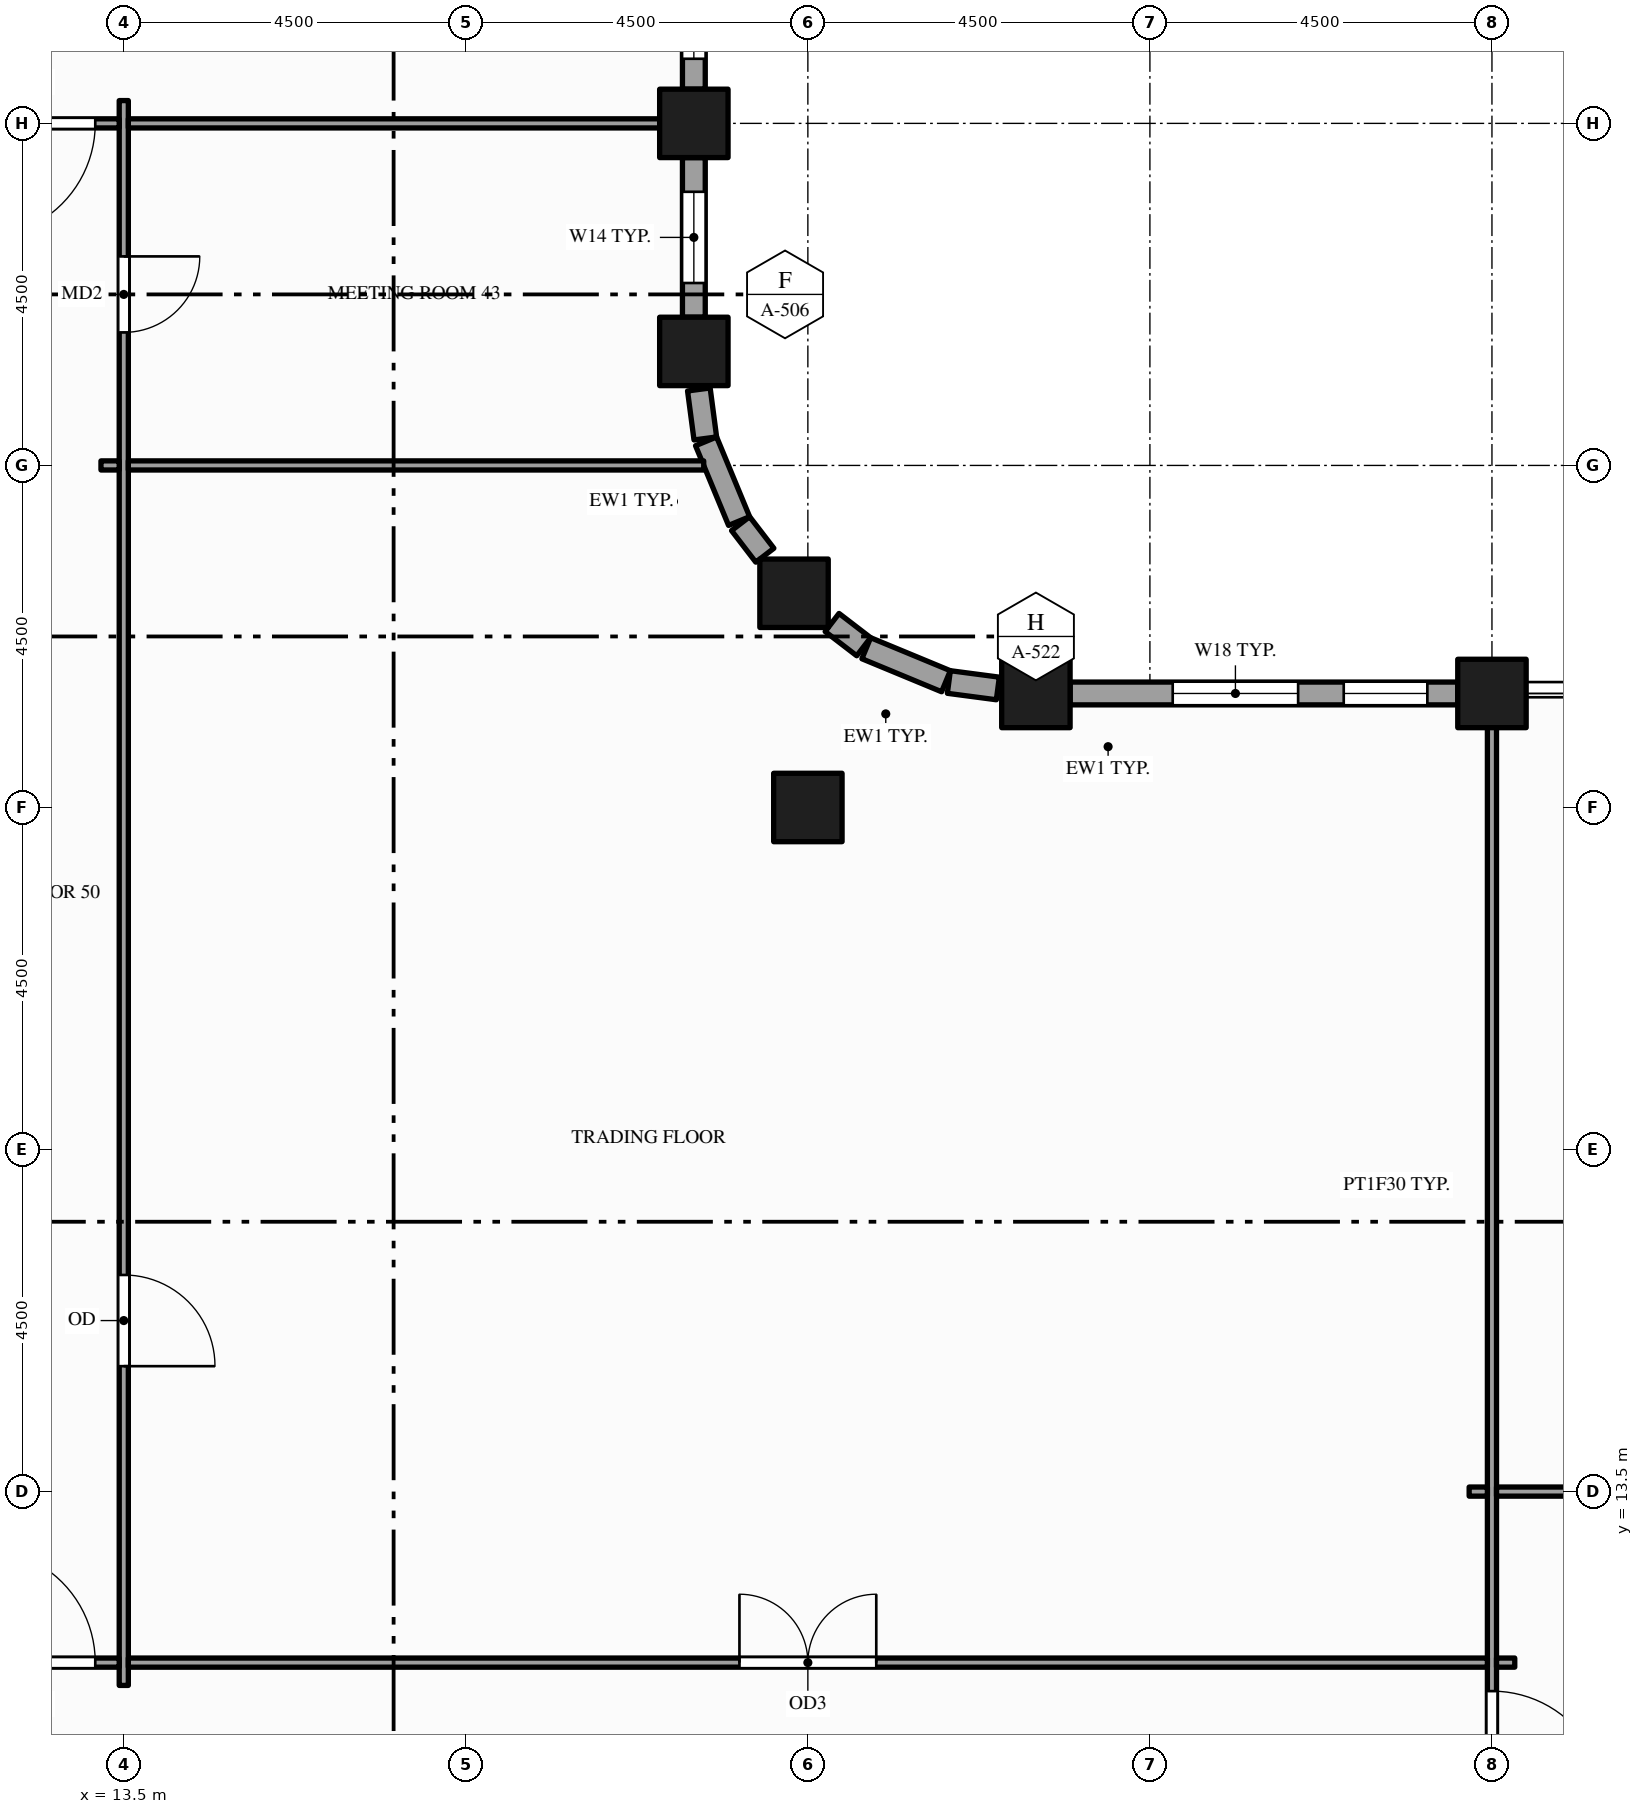
"""IFC4 building model, lengths in metres.
Left out: names, types, materials, properties, quantities, classifications, styles, units other than length and angle.
Written with IfcOpenShell. Run it as: python <this file> out.ifc"""

import sys

from ifc_helpers import new_model, si_unit, direction, frame, frame_2d, origin, origin_2d, place, context, subcontext, project, spatial, rectangle, hollow_rectangle, extrude, element, fill, save


model = new_model("IFC4")
c1 = context("Model", 3, precision=1e-05, world=origin(), true_north=direction((0.0, 1.0)))
c2 = subcontext(c1, "Body", "Model", "MODEL_VIEW")
j1 = project(units=[si_unit("LENGTHUNIT", "METRE"), si_unit("PLANEANGLEUNIT", "RADIAN")], contexts=[c1])
p1 = place(None, origin())
s1 = spatial("IfcSite", under=j1, at=p1, CompositionType="ELEMENT")
p2 = place(p1, origin())
s2 = spatial("IfcBuilding", under=s1, at=p2, CompositionType="ELEMENT")
p3 = place(p2, frame((0.0, 0.0, 151.0)))
s3 = spatial("IfcBuildingStorey", under=s2, at=p3, CompositionType="ELEMENT", Elevation=151.0)
for number, where, z_axis, x_axis in (
    (1, (21.0, 28.5, -0.15), (0.0, 0.0, 1.0), (1.0, 0.0, 0.0)),
    (2, (21.0, 31.5, -0.15), (0.0, 0.0, 1.0), (1.0, 0.0, 0.0)),
    (3, (22.318, 25.318, -0.15), (0.0, 0.0, 1.0), (1.0, 0.0, 0.0)),
    (4, (22.5, 22.5, -0.15), (0.0, 0.0, 1.0), (1.0, 0.0, 0.0)),
    (5, (25.5, 24.0, -0.15), (0.0, 0.0, 1.0), (1.0, 0.0, 0.0)),
    (6, (31.5, 24.0, -0.15), (0.0, 0.0, 1.0), (1.0, 0.0, 0.0)),
):
    element("IfcColumn", number, at=place(p3, frame(where, z_axis=z_axis, x_axis=x_axis)), inside=s3, PredefinedType="COLUMN", context=c2, shape_type="SweptSolid", body=[
        extrude(hollow_rectangle(XDim=0.9, YDim=0.9, WallThickness=0.045, at=origin_2d()), origin(), (0.0, 0.0, 1.0), 4.0),
    ])
p4 = place(p3, frame((31.05, 24.0, 0.0), z_axis=(0.0, 0.0, 1.0), x_axis=(-1.0, 0.0, 0.0)))
e7 = element("IfcWall", 7, at=p4, inside=s3, PredefinedType="STANDARD", context=c2, shape_type="SweptSolid", body=[
    extrude(rectangle(XDim=5.1, YDim=0.3, at=frame_2d((2.55, 0.0))), origin(), (0.0, 0.0, 1.0), 2.87),
])
p5 = place(p4, frame((0.4, 0.0, 0.9)))
e8 = element("IfcOpeningElement", 8, at=p5, cuts=e7, PredefinedType="OPENING", context=c2, shape_type="SweptSolid", body=[
    extrude(rectangle(XDim=1.1, YDim=1.75, at=frame_2d((0.55, 0.875))), frame((0.0, 0.16, 0.0), z_axis=(0.0, -1.0, 0.0), x_axis=(1.0, 0.0, 0.0)), (0.0, 0.0, 1.0), 0.32),
])
p6 = place(p4, frame((2.1, 0.0, 0.9)))
e9 = element("IfcOpeningElement", 9, at=p6, cuts=e7, PredefinedType="OPENING", context=c2, shape_type="SweptSolid", body=[
    extrude(rectangle(XDim=1.65, YDim=1.75, at=frame_2d((0.825, 0.875))), frame((0.0, 0.16, 0.0), z_axis=(0.0, -1.0, 0.0), x_axis=(1.0, 0.0, 0.0)), (0.0, 0.0, 1.0), 0.32),
])
p7 = place(p3, frame((25.0, 24.066, 0.0), z_axis=(0.0, 0.0, 1.0), x_axis=(-0.991423590996, 0.130687655177, 0.0)))
e10 = element("IfcWall", 10, at=p7, inside=s3, PredefinedType="STANDARD", context=c2, shape_type="SweptSolid", body=[
    extrude(rectangle(XDim=0.65, YDim=0.3, at=frame_2d((0.325, 0.0))), origin(), (0.0, 0.0, 1.0), 2.87),
])
p8 = place(p3, frame((24.317, 24.161, 0.0), z_axis=(0.0, 0.0, 1.0), x_axis=(-0.923914616768, 0.382598720491, 0.0)))
e11 = element("IfcWall", 11, at=p8, inside=s3, PredefinedType="STANDARD", context=c2, shape_type="SweptSolid", body=[
    extrude(rectangle(XDim=1.135, YDim=0.3, at=frame_2d((0.568, 0.0))), origin(), (0.0, 0.0, 1.0), 3.149),
])
for number, where, z_axis, x_axis in (
    (12, (23.234, 24.615, 0.0), (0.0, 0.0, 1.0), (-0.794, 0.609, 0.0)),
    (13, (21.934, 25.819, 0.0), (0.0, 0.0, 1.0), (-0.609, 0.794, 0.0)),
):
    element("IfcWall", number, at=place(p3, frame(where, z_axis=z_axis, x_axis=x_axis)), inside=s3, PredefinedType="STANDARD", context=c2, shape_type="SweptSolid", body=[
        extrude(rectangle(XDim=0.524, YDim=0.3, at=frame_2d((0.262, 0.0))), origin(), (0.0, 0.0, 1.0), 3.149),
    ])
p9 = place(p3, frame((21.595, 26.268, 0.0), z_axis=(0.0, 0.0, 1.0), x_axis=(-0.382598720491, 0.923914616768, 0.0)))
e14 = element("IfcWall", 14, at=p9, inside=s3, PredefinedType="STANDARD", context=c2, shape_type="SweptSolid", body=[
    extrude(rectangle(XDim=1.135, YDim=0.3, at=frame_2d((0.568, 0.0))), origin(), (0.0, 0.0, 1.0), 3.149),
])
p10 = place(p3, frame((21.151, 27.355, 0.0), z_axis=(0.0, 0.0, 1.0), x_axis=(-0.130687655177, 0.991423590996, 0.0)))
e15 = element("IfcWall", 15, at=p10, inside=s3, PredefinedType="STANDARD", context=c2, shape_type="SweptSolid", body=[
    extrude(rectangle(XDim=0.65, YDim=0.3, at=frame_2d((0.325, 0.0))), origin(), (0.0, 0.0, 1.0), 3.149),
])
p11 = place(p3, frame((21.0, 28.95, 0.0), z_axis=(0.0, 0.0, 1.0), x_axis=(0.0, 1.0, 0.0)))
e16 = element("IfcWall", 16, at=p11, inside=s3, PredefinedType="STANDARD", context=c2, shape_type="SweptSolid", body=[
    extrude(rectangle(XDim=2.1, YDim=0.3, at=frame_2d((1.05, 0.0))), origin(), (0.0, 0.0, 1.0), 3.149),
])
p12 = place(p11, frame((0.45, 0.0, 0.9)))
e17 = element("IfcOpeningElement", 17, at=p12, cuts=e16, PredefinedType="OPENING", context=c2, shape_type="SweptSolid", body=[
    extrude(rectangle(XDim=1.2, YDim=2.0, at=frame_2d((0.6, 1.0))), frame((0.0, 0.16, 0.0), z_axis=(0.0, -1.0, 0.0), x_axis=(1.0, 0.0, 0.0)), (0.0, 0.0, 1.0), 0.32),
])
p13 = place(p3, frame((21.0, 31.95, 0.0), z_axis=(0.0, 0.0, 1.0), x_axis=(0.0, 1.0, 0.0)))
e18 = element("IfcWall", 18, at=p13, inside=s3, PredefinedType="STANDARD", context=c2, shape_type="SweptSolid", body=[
    extrude(rectangle(XDim=4.05, YDim=0.3, at=frame_2d((2.025, 0.0))), origin(), (0.0, 0.0, 1.0), 3.149),
])
p14 = place(p13, frame((0.4, 0.0, 0.9)))
e19 = element("IfcOpeningElement", 19, at=p14, cuts=e18, PredefinedType="OPENING", context=c2, shape_type="SweptSolid", body=[
    extrude(rectangle(XDim=1.1, YDim=2.0, at=frame_2d((0.55, 1.0))), frame((0.0, 0.16, 0.0), z_axis=(0.0, -1.0, 0.0), x_axis=(1.0, 0.0, 0.0)), (0.0, 0.0, 1.0), 0.32),
])
p15 = place(p13, frame((2.1, 0.0, 0.9)))
e20 = element("IfcOpeningElement", 20, at=p15, cuts=e18, PredefinedType="OPENING", context=c2, shape_type="SweptSolid", body=[
    extrude(rectangle(XDim=1.55, YDim=2.0, at=frame_2d((0.775, 1.0))), frame((0.0, 0.16, 0.0), z_axis=(0.0, -1.0, 0.0), x_axis=(1.0, 0.0, 0.0)), (0.0, 0.0, 1.0), 0.32),
])
p16 = place(p3, frame((13.5, 10.95, 0.0), z_axis=(0.0, 0.0, 1.0), x_axis=(0.0, 1.0, 0.0)))
e21 = element("IfcWall", 21, at=p16, inside=s3, PredefinedType="PARTITIONING", context=c2, shape_type="SweptSolid", body=[
    extrude(rectangle(XDim=20.85, YDim=0.12, at=frame_2d((10.425, 0.0))), origin(), (0.0, 0.0, 1.0), 2.6),
])
p17 = place(p16, frame((17.8, 0.0, 0.0)))
e22 = element("IfcOpeningElement", 22, at=p17, cuts=e21, PredefinedType="OPENING", context=c2, shape_type="SweptSolid", body=[
    extrude(rectangle(XDim=1.0, YDim=2.1, at=frame_2d((0.5, 1.05))), frame((0.0, 0.07, 0.0), z_axis=(0.0, -1.0, 0.0), x_axis=(1.0, 0.0, 0.0)), (0.0, 0.0, 1.0), 0.14),
])
p18 = place(p16, frame((4.2, 0.0, 0.0)))
e23 = element("IfcOpeningElement", 23, at=p18, cuts=e21, PredefinedType="OPENING", context=c2, shape_type="SweptSolid", body=[
    extrude(rectangle(XDim=1.2, YDim=2.1, at=frame_2d((0.6, 1.05))), frame((0.0, 0.07, 0.0), z_axis=(0.0, -1.0, 0.0), x_axis=(1.0, 0.0, 0.0)), (0.0, 0.0, 1.0), 0.14),
])
p19 = place(p3, frame((31.5, 1.65, 0.0), z_axis=(0.0, 0.0, 1.0), x_axis=(0.0, 1.0, 0.0)))
e24 = element("IfcWall", 24, at=p19, inside=s3, PredefinedType="PARTITIONING", context=c2, shape_type="SweptSolid", body=[
    extrude(rectangle(XDim=22.2, YDim=0.12, at=frame_2d((11.1, 0.0))), origin(), (0.0, 0.0, 1.0), 2.87),
])
p20 = place(p19, frame((7.725, 0.0, 0.0)))
e25 = element("IfcOpeningElement", 25, at=p20, cuts=e24, PredefinedType="OPENING", context=c2, shape_type="SweptSolid", body=[
    extrude(rectangle(XDim=1.5, YDim=2.1, at=frame_2d((0.75, 1.05))), frame((0.0, 0.07, 0.0), z_axis=(0.0, -1.0, 0.0), x_axis=(1.0, 0.0, 0.0)), (0.0, 0.0, 1.0), 0.14),
])
p21 = place(p3, frame((11.31, 11.25, 0.0), z_axis=(0.0, 0.0, 1.0), x_axis=(1.0, 0.0, 0.0)))
e26 = element("IfcWall", 26, at=p21, inside=s3, PredefinedType="PARTITIONING", context=c2, shape_type="SweptSolid", body=[
    extrude(rectangle(XDim=2.13, YDim=0.12, at=frame_2d((1.065, 0.0))), origin(), (0.0, 0.0, 1.0), 2.87),
])
p22 = place(p21, frame((0.315, 0.0, 0.0)))
e27 = element("IfcOpeningElement", 27, at=p22, cuts=e26, PredefinedType="OPENING", context=c2, shape_type="SweptSolid", body=[
    extrude(rectangle(XDim=1.5, YDim=2.1, at=frame_2d((0.75, 1.05))), frame((0.0, 0.07, 0.0), z_axis=(0.0, -1.0, 0.0), x_axis=(1.0, 0.0, 0.0)), (0.0, 0.0, 1.0), 0.14),
])
p23 = place(p3, frame((13.56, 11.25, 0.0), z_axis=(0.0, 0.0, 1.0), x_axis=(1.0, 0.0, 0.0)))
e28 = element("IfcWall", 28, at=p23, inside=s3, PredefinedType="PARTITIONING", context=c2, shape_type="SweptSolid", body=[
    extrude(rectangle(XDim=17.88, YDim=0.12, at=frame_2d((8.94, 0.0))), origin(), (0.0, 0.0, 1.0), 2.87),
])
p24 = place(p23, frame((8.04, 0.0, 0.0)))
e29 = element("IfcOpeningElement", 29, at=p24, cuts=e28, PredefinedType="OPENING", context=c2, shape_type="SweptSolid", body=[
    extrude(rectangle(XDim=1.8, YDim=2.1, at=frame_2d((0.9, 1.05))), frame((0.0, 0.07, 0.0), z_axis=(0.0, -1.0, 0.0), x_axis=(1.0, 0.0, 0.0)), (0.0, 0.0, 1.0), 0.14),
])
for number, where, z_axis, x_axis in (
    (30, (31.56, 11.25, 0.0), (0.0, 0.0, 1.0), (1.0, 0.0, 0.0)),
    (31, (31.2, 13.5, 0.0), (0.0, 0.0, 1.0), (1.0, 0.0, 0.0)),
):
    element("IfcWall", number, at=place(p3, frame(where, z_axis=z_axis, x_axis=x_axis)), inside=s3, PredefinedType="PARTITIONING", context=c2, shape_type="SweptSolid", body=[
        extrude(rectangle(XDim=0.24, YDim=0.12, at=frame_2d((0.12, 0.0))), origin(), (0.0, 0.0, 1.0), 2.87),
    ])
p25 = place(p3, frame((31.56, 13.5, 0.0), z_axis=(0.0, 0.0, 1.0), x_axis=(1.0, 0.0, 0.0)))
e32 = element("IfcWall", 32, at=p25, inside=s3, PredefinedType="PARTITIONING", context=c2, shape_type="SweptSolid", body=[
    extrude(rectangle(XDim=6.63, YDim=0.12, at=frame_2d((3.315, 0.0))), origin(), (0.0, 0.0, 1.0), 2.87),
])
p26 = place(p25, frame((2.715, 0.0, 0.0)))
e33 = element("IfcOpeningElement", 33, at=p26, cuts=e32, PredefinedType="OPENING", context=c2, shape_type="SweptSolid", body=[
    extrude(rectangle(XDim=1.2, YDim=2.1, at=frame_2d((0.6, 1.05))), frame((0.0, 0.07, 0.0), z_axis=(0.0, -1.0, 0.0), x_axis=(1.0, 0.0, 0.0)), (0.0, 0.0, 1.0), 0.14),
])
p27 = place(p3, frame((13.2, 27.0, 0.0), z_axis=(0.0, 0.0, 1.0), x_axis=(1.0, 0.0, 0.0)))
e34 = element("IfcWall", 34, at=p27, inside=s3, PredefinedType="PARTITIONING", context=c2, shape_type="SweptSolid", body=[
    extrude(rectangle(XDim=0.24, YDim=0.12, at=frame_2d((0.12, 0.0))), origin(), (0.0, 0.0, 1.0), 2.87),
])
p28 = place(p3, frame((13.56, 27.0, 0.0), z_axis=(0.0, 0.0, 1.0), x_axis=(1.0, 0.0, 0.0)))
e35 = element("IfcWall", 35, at=p28, inside=s3, PredefinedType="PARTITIONING", context=c2, shape_type="SweptSolid", body=[
    extrude(rectangle(XDim=7.57, YDim=0.12, at=frame_2d((3.785, 0.0))), origin(), (0.0, 0.0, 1.0), 2.87),
])
p29 = place(p3, frame((11.31, 31.5, 0.0), z_axis=(0.0, 0.0, 1.0), x_axis=(1.0, 0.0, 0.0)))
e36 = element("IfcWall", 36, at=p29, inside=s3, PredefinedType="PARTITIONING", context=c2, shape_type="SweptSolid", body=[
    extrude(rectangle(XDim=2.13, YDim=0.12, at=frame_2d((1.065, 0.0))), origin(), (0.0, 0.0, 1.0), 2.87),
])
p30 = place(p29, frame((0.315, 0.0, 0.0)))
e37 = element("IfcOpeningElement", 37, at=p30, cuts=e36, PredefinedType="OPENING", context=c2, shape_type="SweptSolid", body=[
    extrude(rectangle(XDim=1.5, YDim=2.1, at=frame_2d((0.75, 1.05))), frame((0.0, 0.07, 0.0), z_axis=(0.0, -1.0, 0.0), x_axis=(1.0, 0.0, 0.0)), (0.0, 0.0, 1.0), 0.14),
])
p31 = place(p3, frame((13.56, 31.5, 0.0), z_axis=(0.0, 0.0, 1.0), x_axis=(1.0, 0.0, 0.0)))
e38 = element("IfcWall", 38, at=p31, inside=s3, PredefinedType="PARTITIONING", context=c2, shape_type="SweptSolid", body=[
    extrude(rectangle(XDim=7.29, YDim=0.12, at=frame_2d((3.645, 0.0))), origin(), (0.0, 0.0, 1.0), 2.87),
])
p32 = place(p5, origin())
e39 = element("IfcWindow", 39, at=p32, inside=s3, PartitioningType="SINGLE_PANEL", PredefinedType="WINDOW", context=c2, shape_type="SweptSolid", body=[
    extrude(rectangle(XDim=1.1, YDim=1.75, at=frame_2d((0.55, 0.875))), frame((0.0, 0.03, 0.0), z_axis=(0.0, -1.0, 0.0), x_axis=(1.0, 0.0, 0.0)), (0.0, 0.0, 1.0), 0.06),
])
fill(e8, e39)
p33 = place(p6, origin())
e40 = element("IfcWindow", 40, at=p33, inside=s3, PartitioningType="SINGLE_PANEL", PredefinedType="WINDOW", context=c2, shape_type="SweptSolid", body=[
    extrude(rectangle(XDim=1.65, YDim=1.75, at=frame_2d((0.825, 0.875))), frame((0.0, 0.03, 0.0), z_axis=(0.0, -1.0, 0.0), x_axis=(1.0, 0.0, 0.0)), (0.0, 0.0, 1.0), 0.06),
])
fill(e9, e40)
p34 = place(p12, origin())
e41 = element("IfcWindow", 41, at=p34, inside=s3, PartitioningType="SINGLE_PANEL", PredefinedType="WINDOW", context=c2, shape_type="SweptSolid", body=[
    extrude(rectangle(XDim=1.2, YDim=2.0, at=frame_2d((0.6, 1.0))), frame((0.0, 0.03, 0.0), z_axis=(0.0, -1.0, 0.0), x_axis=(1.0, 0.0, 0.0)), (0.0, 0.0, 1.0), 0.06),
])
fill(e17, e41)
p35 = place(p14, origin())
e42 = element("IfcWindow", 42, at=p35, inside=s3, PartitioningType="SINGLE_PANEL", PredefinedType="WINDOW", context=c2, shape_type="SweptSolid", body=[
    extrude(rectangle(XDim=1.1, YDim=2.0, at=frame_2d((0.55, 1.0))), frame((0.0, 0.03, 0.0), z_axis=(0.0, -1.0, 0.0), x_axis=(1.0, 0.0, 0.0)), (0.0, 0.0, 1.0), 0.06),
])
fill(e19, e42)
p36 = place(p20, origin())
e43 = element("IfcDoor", 43, at=p36, inside=s3, OperationType="SINGLE_SWING_LEFT", PredefinedType="DOOR", context=c2, shape_type="SweptSolid", body=[
    extrude(rectangle(XDim=1.5, YDim=2.1, at=frame_2d((0.75, 1.05))), frame((0.0, 0.025, 0.0), z_axis=(0.0, -1.0, 0.0), x_axis=(1.0, 0.0, 0.0)), (0.0, 0.0, 1.0), 0.05),
])
fill(e25, e43)
p37 = place(p24, origin())
e44 = element("IfcDoor", 44, at=p37, inside=s3, OperationType="DOUBLE_DOOR_SINGLE_SWING", PredefinedType="DOOR", context=c2, shape_type="SweptSolid", body=[
    extrude(rectangle(XDim=1.8, YDim=2.1, at=frame_2d((0.9, 1.05))), frame((0.0, 0.025, 0.0), z_axis=(0.0, -1.0, 0.0), x_axis=(1.0, 0.0, 0.0)), (0.0, 0.0, 1.0), 0.05),
])
fill(e29, e44)
p38 = place(p22, origin())
e45 = element("IfcDoor", 45, at=p38, inside=s3, OperationType="SINGLE_SWING_LEFT", PredefinedType="DOOR", context=c2, shape_type="SweptSolid", body=[
    extrude(rectangle(XDim=1.5, YDim=2.1, at=frame_2d((0.75, 1.05))), frame((0.0, 0.025, 0.0), z_axis=(0.0, -1.0, 0.0), x_axis=(1.0, 0.0, 0.0)), (0.0, 0.0, 1.0), 0.05),
])
fill(e27, e45)
p39 = place(p30, origin())
e46 = element("IfcDoor", 46, at=p39, inside=s3, OperationType="SINGLE_SWING_LEFT", PredefinedType="DOOR", context=c2, shape_type="SweptSolid", body=[
    extrude(rectangle(XDim=1.5, YDim=2.1, at=frame_2d((0.75, 1.05))), frame((0.0, 0.025, 0.0), z_axis=(0.0, -1.0, 0.0), x_axis=(1.0, 0.0, 0.0)), (0.0, 0.0, 1.0), 0.05),
])
fill(e37, e46)
p40 = place(p17, origin())
e47 = element("IfcDoor", 47, at=p40, inside=s3, OperationType="SINGLE_SWING_RIGHT", PredefinedType="DOOR", context=c2, shape_type="SweptSolid", body=[
    extrude(rectangle(XDim=1.0, YDim=2.1, at=frame_2d((0.5, 1.05))), frame((0.0, 0.025, 0.0), z_axis=(0.0, -1.0, 0.0), x_axis=(1.0, 0.0, 0.0)), (0.0, 0.0, 1.0), 0.05),
])
fill(e22, e47)
p41 = place(p18, origin())
e48 = element("IfcDoor", 48, at=p41, inside=s3, OperationType="SINGLE_SWING_LEFT", PredefinedType="DOOR", context=c2, shape_type="SweptSolid", body=[
    extrude(rectangle(XDim=1.2, YDim=2.1, at=frame_2d((0.6, 1.05))), frame((0.0, 0.025, 0.0), z_axis=(0.0, -1.0, 0.0), x_axis=(1.0, 0.0, 0.0)), (0.0, 0.0, 1.0), 0.05),
])
fill(e23, e48)
save(model, sys.argv[1])
